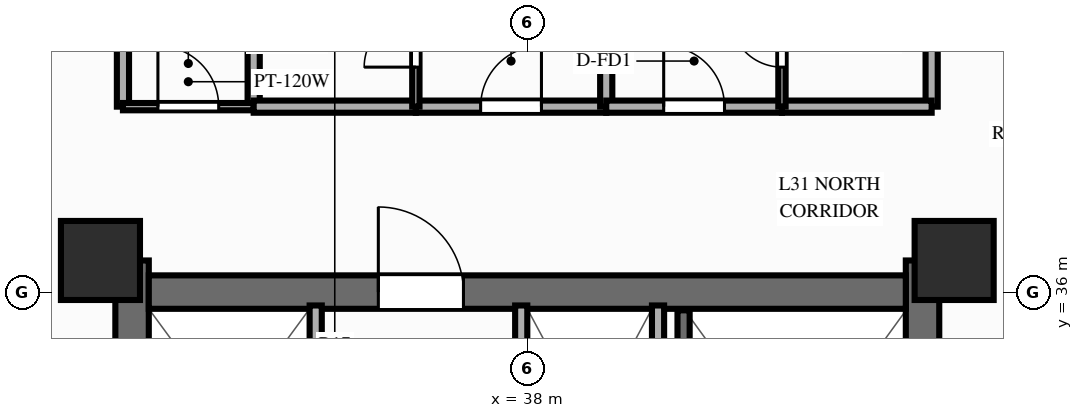
"""IFC4 building model, lengths in metres.
Left out: names, types, materials, properties, quantities, classifications, styles, units other than length and angle.
Written with IfcOpenShell. Run it as: python <this file> out.ifc"""

import sys

from ifc_helpers import new_model, si_unit, direction, frame, frame_2d, origin, origin_2d, place, context, subcontext, project, spatial, rectangle, extrude, source, transform, mapped, element, fill, save


model = new_model("IFC4")
c1 = context("Model", 3, precision=1e-05, world=origin(), true_north=direction((0.0, 1.0)))
c2 = subcontext(c1, "Body", "Model", "MODEL_VIEW")
j1 = project(units=[si_unit("LENGTHUNIT", "METRE"), si_unit("PLANEANGLEUNIT", "RADIAN")], contexts=[c1])
p1 = place(None, origin())
s1 = spatial("IfcSite", under=j1, at=p1, CompositionType="ELEMENT")
p2 = place(p1, origin())
s2 = spatial("IfcBuilding", under=s1, at=p2, CompositionType="ELEMENT")
p3 = place(p2, frame((0.0, 0.0, 98.85)))
s3 = spatial("IfcBuildingStorey", under=s2, at=p3, CompositionType="ELEMENT", Elevation=98.85)
p4 = place(p3, frame((31.5, 17.48, 0.0), z_axis=(0.0, 0.0, 1.0), x_axis=(0.0, 1.0, 0.0)))
e1 = element("IfcWall", 1, at=p4, inside=s3, PredefinedType="SHEAR", context=c2, shape_type="SweptSolid", body=[
    extrude(rectangle(XDim=19.04, YDim=0.55, at=frame_2d((9.52, 0.0))), origin(), (0.0, 0.0, 1.0), 3.0),
])
p5 = place(p4, frame((6.32, 0.0, 0.0)))
e2 = element("IfcOpeningElement", 2, at=p5, cuts=e1, PredefinedType="OPENING", context=c2, shape_type="SweptSolid", body=[
    extrude(rectangle(XDim=1.1, YDim=2.15, at=frame_2d((0.55, 1.075))), frame((0.0, 0.287, 0.0), z_axis=(0.0, -1.0, 0.0), x_axis=(1.0, 0.0, 0.0)), (0.0, 0.0, 1.0), 0.574),
])
p6 = place(p3, frame((44.5, 17.48, 0.0), z_axis=(0.0, 0.0, 1.0), x_axis=(0.0, 1.0, 0.0)))
e3 = element("IfcWall", 3, at=p6, inside=s3, PredefinedType="SHEAR", context=c2, shape_type="SweptSolid", body=[
    extrude(rectangle(XDim=19.04, YDim=0.55, at=frame_2d((9.52, 0.0))), origin(), (0.0, 0.0, 1.0), 3.0),
])
p7 = place(p6, frame((12.67, 0.0, 0.0), z_axis=(0.0, 0.0, 1.0), x_axis=(-1.0, 0.0, 0.0)))
e4 = element("IfcOpeningElement", 4, at=p7, cuts=e3, PredefinedType="OPENING", context=c2, shape_type="SweptSolid", body=[
    extrude(rectangle(XDim=1.1, YDim=2.15, at=frame_2d((0.55, 1.075))), frame((0.0, 0.287, 0.0), z_axis=(0.0, -1.0, 0.0), x_axis=(1.0, 0.0, 0.0)), (0.0, 0.0, 1.0), 0.574),
])
p8 = place(p3, frame((31.775, 36.0, 0.0), z_axis=(0.0, 0.0, 1.0), x_axis=(1.0, 0.0, 0.0)))
e5 = element("IfcWall", 5, at=p8, inside=s3, PredefinedType="SHEAR", context=c2, shape_type="SweptSolid", body=[
    extrude(rectangle(XDim=12.45, YDim=0.55, at=frame_2d((6.225, 0.0))), origin(), (0.0, 0.0, 1.0), 3.0),
])
p9 = place(p8, frame((5.175, 0.0, 0.0), z_axis=(0.0, 0.0, 1.0), x_axis=(-1.0, 0.0, 0.0)))
e6 = element("IfcOpeningElement", 6, at=p9, cuts=e5, PredefinedType="OPENING", context=c2, shape_type="SweptSolid", body=[
    extrude(rectangle(XDim=1.4, YDim=2.15, at=frame_2d((0.7, 1.075))), frame((0.0, 0.287, 0.0), z_axis=(0.0, -1.0, 0.0), x_axis=(1.0, 0.0, 0.0)), (0.0, 0.0, 1.0), 0.574),
])
m1 = source(origin(), c2, "Body", "SweptSolid", [
    extrude(rectangle(XDim=1.3, YDim=1.3, at=origin_2d()), origin(), (0.0, 0.0, 1.0), 3.0),
])
for number, where, z_axis, x_axis in (
    (7, (30.98, 36.52, 0.0), (0.0, 0.0, 1.0), (1.0, 0.0, 0.0)),
    (8, (45.02, 36.52, 0.0), (0.0, 0.0, 1.0), (1.0, 0.0, 0.0)),
):
    element("IfcColumn", number, at=place(p3, frame(where, z_axis=z_axis, x_axis=x_axis)), inside=s3, PredefinedType="COLUMN", context=c2, shape_type="MappedRepresentation", body=[
        mapped(m1, transform((0.0, 0.0, 0.0), scale=1.0)),
    ])
p10 = place(p3, frame((40.15, 31.8, 0.0), z_axis=(0.0, 0.0, 1.0), x_axis=(0.0, 1.0, 0.0)))
e9 = element("IfcWall", 9, at=p10, inside=s3, PredefinedType="PARTITIONING", context=c2, shape_type="SweptSolid", body=[
    extrude(rectangle(XDim=3.98, YDim=0.2, at=frame_2d((1.99, 0.0))), origin(), (0.0, 0.0, 1.0), 2.79),
])
p11 = place(p3, frame((40.57, 28.65, 0.0), z_axis=(0.0, 0.0, 1.0), x_axis=(0.0, 1.0, 0.0)))
e10 = element("IfcWall", 10, at=p11, inside=s3, PredefinedType="SOLIDWALL", context=c2, shape_type="SweptSolid", body=[
    extrude(rectangle(XDim=7.05, YDim=0.2, at=frame_2d((3.525, 0.0))), origin(), (0.0, 0.0, 1.0), 2.79),
])
p12 = place(p3, frame((34.52, 25.44, 0.0), z_axis=(0.0, 0.0, 1.0), x_axis=(0.0, 1.0, 0.0)))
e11 = element("IfcWall", 11, at=p12, inside=s3, PredefinedType="PARTITIONING", context=c2, shape_type="SweptSolid", body=[
    extrude(rectangle(XDim=10.34, YDim=0.2, at=frame_2d((5.17, 0.0))), origin(), (0.0, 0.0, 1.0), 2.79),
])
p13 = place(p12, frame((1.15, 0.0, 0.0)))
e12 = element("IfcOpeningElement", 12, at=p13, cuts=e11, PredefinedType="OPENING", context=c2, shape_type="SweptSolid", body=[
    extrude(rectangle(XDim=0.9, YDim=2.1, at=frame_2d((0.45, 1.05))), frame((0.0, 0.112, 0.0), z_axis=(0.0, -1.0, 0.0), x_axis=(1.0, 0.0, 0.0)), (0.0, 0.0, 1.0), 0.224),
])
p14 = place(p12, frame((4.35, 0.0, 0.0)))
e13 = element("IfcOpeningElement", 13, at=p14, cuts=e11, PredefinedType="OPENING", context=c2, shape_type="SweptSolid", body=[
    extrude(rectangle(XDim=0.9, YDim=2.1, at=frame_2d((0.45, 1.05))), frame((0.0, 0.112, 0.0), z_axis=(0.0, -1.0, 0.0), x_axis=(1.0, 0.0, 0.0)), (0.0, 0.0, 1.0), 0.224),
])
p15 = place(p3, frame((37.9, 25.44, 0.0), z_axis=(0.0, 0.0, 1.0), x_axis=(0.0, 1.0, 0.0)))
e14 = element("IfcWall", 14, at=p15, inside=s3, PredefinedType="PARTITIONING", context=c2, shape_type="SweptSolid", body=[
    extrude(rectangle(XDim=10.34, YDim=0.2, at=frame_2d((5.17, 0.0))), origin(), (0.0, 0.0, 1.0), 2.79),
])
p16 = place(p15, frame((0.32, 0.0, 0.0)))
e15 = element("IfcOpeningElement", 15, at=p16, cuts=e14, PredefinedType="OPENING", context=c2, shape_type="SweptSolid", body=[
    extrude(rectangle(XDim=1.0, YDim=2.15, at=frame_2d((0.5, 1.075))), frame((0.0, 0.112, 0.0), z_axis=(0.0, -1.0, 0.0), x_axis=(1.0, 0.0, 0.0)), (0.0, 0.0, 1.0), 0.224),
])
p17 = place(p15, frame((1.71, 0.0, 0.0)))
e16 = element("IfcOpeningElement", 16, at=p17, cuts=e14, PredefinedType="OPENING", context=c2, shape_type="SweptSolid", body=[
    extrude(rectangle(XDim=1.0, YDim=2.15, at=frame_2d((0.5, 1.075))), frame((0.0, 0.112, 0.0), z_axis=(0.0, -1.0, 0.0), x_axis=(1.0, 0.0, 0.0)), (0.0, 0.0, 1.0), 0.224),
])
p18 = place(p15, frame((3.51, 0.0, 0.0)))
e17 = element("IfcOpeningElement", 17, at=p18, cuts=e14, PredefinedType="OPENING", context=c2, shape_type="SweptSolid", body=[
    extrude(rectangle(XDim=1.0, YDim=2.15, at=frame_2d((0.5, 1.075))), frame((0.0, 0.112, 0.0), z_axis=(0.0, -1.0, 0.0), x_axis=(1.0, 0.0, 0.0)), (0.0, 0.0, 1.0), 0.224),
])
p19 = place(p15, frame((5.01, 0.0, 0.0)))
e18 = element("IfcOpeningElement", 18, at=p19, cuts=e14, PredefinedType="OPENING", context=c2, shape_type="SweptSolid", body=[
    extrude(rectangle(XDim=1.0, YDim=2.15, at=frame_2d((0.5, 1.075))), frame((0.0, 0.112, 0.0), z_axis=(0.0, -1.0, 0.0), x_axis=(1.0, 0.0, 0.0)), (0.0, 0.0, 1.0), 0.224),
])
for number, where, z_axis, x_axis in (
    (19, (31.35, 39.05, 0.0), (0.0, 0.0, 1.0), (0.0, 1.0, 0.0)),
    (20, (44.65, 39.05, 0.0), (0.0, 0.0, 1.0), (0.0, 1.0, 0.0)),
):
    element("IfcWall", number, at=place(p3, frame(where, z_axis=z_axis, x_axis=x_axis)), inside=s3, PredefinedType="PARTITIONING", context=c2, shape_type="SweptSolid", body=[
        extrude(rectangle(XDim=11.8, YDim=0.2, at=frame_2d((5.9, 0.0))), origin(), (0.0, 0.0, 1.0), 2.34),
    ])
p20 = place(p3, frame((33.5, 39.05, 0.0), z_axis=(0.0, 0.0, 1.0), x_axis=(0.0, 1.0, 0.0)))
e21 = element("IfcWall", 21, at=p20, inside=s3, PredefinedType="PARTITIONING", context=c2, shape_type="SweptSolid", body=[
    extrude(rectangle(XDim=11.8, YDim=0.2, at=frame_2d((5.9, 0.0))), origin(), (0.0, 0.0, 1.0), 2.79),
])
p21 = place(p3, frame((31.35, 39.05, 0.0), z_axis=(0.0, 0.0, 1.0), x_axis=(1.0, 0.0, 0.0)))
e22 = element("IfcWall", 22, at=p21, inside=s3, PredefinedType="PARTITIONING", context=c2, shape_type="SweptSolid", body=[
    extrude(rectangle(XDim=2.15, YDim=0.12, at=frame_2d((1.075, 0.0))), origin(), (0.0, 0.0, 1.0), 2.79),
])
p22 = place(p21, frame((0.575, 0.0, 0.0)))
e23 = element("IfcOpeningElement", 23, at=p22, cuts=e22, PredefinedType="OPENING", context=c2, shape_type="SweptSolid", body=[
    extrude(rectangle(XDim=1.0, YDim=2.1, at=frame_2d((0.5, 1.05))), frame((0.0, 0.072, 0.0), z_axis=(0.0, -1.0, 0.0), x_axis=(1.0, 0.0, 0.0)), (0.0, 0.0, 1.0), 0.144),
])
p23 = place(p3, frame((33.5, 39.05, 0.0), z_axis=(0.0, 0.0, 1.0), x_axis=(1.0, 0.0, 0.0)))
e24 = element("IfcWall", 24, at=p23, inside=s3, PredefinedType="PARTITIONING", context=c2, shape_type="SweptSolid", body=[
    extrude(rectangle(XDim=2.667, YDim=0.2, at=frame_2d((1.333, 0.0))), origin(), (0.0, 0.0, 1.0), 2.79),
])
p24 = place(p3, frame((36.167, 39.05, 0.0), z_axis=(0.0, 0.0, 1.0), x_axis=(1.0, 0.0, 0.0)))
e25 = element("IfcWall", 25, at=p24, inside=s3, PredefinedType="PARTITIONING", context=c2, shape_type="SweptSolid", body=[
    extrude(rectangle(XDim=3.131, YDim=0.2, at=frame_2d((1.565, 0.0))), origin(), (0.0, 0.0, 1.0), 2.79),
])
p25 = place(p24, frame((1.065, 0.0, 0.0)))
e26 = element("IfcOpeningElement", 26, at=p25, cuts=e25, PredefinedType="OPENING", context=c2, shape_type="SweptSolid", body=[
    extrude(rectangle(XDim=1.0, YDim=2.15, at=frame_2d((0.5, 1.075))), frame((0.0, 0.112, 0.0), z_axis=(0.0, -1.0, 0.0), x_axis=(1.0, 0.0, 0.0)), (0.0, 0.0, 1.0), 0.224),
])
p26 = place(p3, frame((36.167, 39.05, 0.0), z_axis=(0.0, 0.0, 1.0), x_axis=(0.0, 1.0, 0.0)))
e27 = element("IfcWall", 27, at=p26, inside=s3, PredefinedType="PARTITIONING", context=c2, shape_type="SweptSolid", body=[
    extrude(rectangle(XDim=2.15, YDim=0.12, at=frame_2d((1.075, 0.0))), origin(), (0.0, 0.0, 1.0), 2.79),
])
p27 = place(p26, frame((0.65, 0.0, 0.0)))
e28 = element("IfcOpeningElement", 28, at=p27, cuts=e27, PredefinedType="OPENING", context=c2, shape_type="SweptSolid", body=[
    extrude(rectangle(XDim=0.85, YDim=2.05, at=frame_2d((0.425, 1.025))), frame((0.0, 0.072, 0.0), z_axis=(0.0, -1.0, 0.0), x_axis=(1.0, 0.0, 0.0)), (0.0, 0.0, 1.0), 0.144),
])
p28 = place(p3, frame((39.298, 39.05, 0.0), z_axis=(0.0, 0.0, 1.0), x_axis=(0.0, 1.0, 0.0)))
e29 = element("IfcWall", 29, at=p28, inside=s3, PredefinedType="PARTITIONING", context=c2, shape_type="SweptSolid", body=[
    extrude(rectangle(XDim=11.8, YDim=0.2, at=frame_2d((5.9, 0.0))), origin(), (0.0, 0.0, 1.0), 2.79),
])
p29 = place(p3, frame((39.298, 39.05, 0.0), z_axis=(0.0, 0.0, 1.0), x_axis=(1.0, 0.0, 0.0)))
e30 = element("IfcWall", 30, at=p29, inside=s3, PredefinedType="PARTITIONING", context=c2, shape_type="SweptSolid", body=[
    extrude(rectangle(XDim=2.89, YDim=0.2, at=frame_2d((1.445, 0.0))), origin(), (0.0, 0.0, 1.0), 2.79),
])
p30 = place(p29, frame((0.945, 0.0, 0.0)))
e31 = element("IfcOpeningElement", 31, at=p30, cuts=e30, PredefinedType="OPENING", context=c2, shape_type="SweptSolid", body=[
    extrude(rectangle(XDim=1.0, YDim=2.15, at=frame_2d((0.5, 1.075))), frame((0.0, 0.112, 0.0), z_axis=(0.0, -1.0, 0.0), x_axis=(1.0, 0.0, 0.0)), (0.0, 0.0, 1.0), 0.224),
])
p31 = place(p3, frame((42.188, 39.05, 0.0), z_axis=(0.0, 0.0, 1.0), x_axis=(1.0, 0.0, 0.0)))
e32 = element("IfcWall", 32, at=p31, inside=s3, PredefinedType="PARTITIONING", context=c2, shape_type="SweptSolid", body=[
    extrude(rectangle(XDim=2.462, YDim=0.2, at=frame_2d((1.231, 0.0))), origin(), (0.0, 0.0, 1.0), 2.79),
])
p32 = place(p3, frame((42.188, 39.05, 0.0), z_axis=(0.0, 0.0, 1.0), x_axis=(0.0, 1.0, 0.0)))
e33 = element("IfcWall", 33, at=p32, inside=s3, PredefinedType="PARTITIONING", context=c2, shape_type="SweptSolid", body=[
    extrude(rectangle(XDim=2.15, YDim=0.12, at=frame_2d((1.075, 0.0))), origin(), (0.0, 0.0, 1.0), 2.79),
])
p33 = place(p32, frame((0.65, 0.0, 0.0)))
e34 = element("IfcOpeningElement", 34, at=p33, cuts=e33, PredefinedType="OPENING", context=c2, shape_type="SweptSolid", body=[
    extrude(rectangle(XDim=0.85, YDim=2.05, at=frame_2d((0.425, 1.025))), frame((0.0, 0.072, 0.0), z_axis=(0.0, -1.0, 0.0), x_axis=(1.0, 0.0, 0.0)), (0.0, 0.0, 1.0), 0.144),
])
m2 = source(origin(), c2, "Body", "SweptSolid", [
    extrude(rectangle(XDim=1.4, YDim=2.15, at=frame_2d((0.7, 1.075))), frame((0.0, 0.025, 0.0), z_axis=(0.0, -1.0, 0.0), x_axis=(1.0, 0.0, 0.0)), (0.0, 0.0, 1.0), 0.05),
])
p34 = place(p9, origin())
e35 = element("IfcDoor", 35, at=p34, inside=s3, OperationType="SINGLE_SWING_RIGHT", PredefinedType="DOOR", context=c2, shape_type="MappedRepresentation", body=[
    mapped(m2, transform((0.0, 0.0, 0.0), scale=1.0)),
])
fill(e6, e35)
m3 = source(origin(), c2, "Body", "SweptSolid", [
    extrude(rectangle(XDim=1.0, YDim=2.1, at=frame_2d((0.5, 1.05))), frame((0.0, 0.025, 0.0), z_axis=(0.0, -1.0, 0.0), x_axis=(1.0, 0.0, 0.0)), (0.0, 0.0, 1.0), 0.05),
])
p35 = place(p22, origin())
e36 = element("IfcDoor", 36, at=p35, inside=s3, OperationType="SINGLE_SWING_LEFT", PredefinedType="DOOR", context=c2, shape_type="MappedRepresentation", body=[
    mapped(m3, transform((0.0, 0.0, 0.0), scale=1.0)),
])
fill(e23, e36)
m4 = source(origin(), c2, "Body", "SweptSolid", [
    extrude(rectangle(XDim=1.0, YDim=2.15, at=frame_2d((0.5, 1.075))), frame((0.0, 0.025, 0.0), z_axis=(0.0, -1.0, 0.0), x_axis=(1.0, 0.0, 0.0)), (0.0, 0.0, 1.0), 0.05),
])
p36 = place(p25, origin())
e37 = element("IfcDoor", 37, at=p36, inside=s3, OperationType="SINGLE_SWING_RIGHT", PredefinedType="DOOR", context=c2, shape_type="MappedRepresentation", body=[
    mapped(m4, transform((0.0, 0.0, 0.0), scale=1.0)),
])
fill(e26, e37)
m5 = source(origin(), c2, "Body", "SweptSolid", [
    extrude(rectangle(XDim=0.85, YDim=2.05, at=frame_2d((0.425, 1.025))), frame((0.0, 0.025, 0.0), z_axis=(0.0, -1.0, 0.0), x_axis=(1.0, 0.0, 0.0)), (0.0, 0.0, 1.0), 0.05),
])
p37 = place(p27, origin())
e38 = element("IfcDoor", 38, at=p37, inside=s3, OperationType="SINGLE_SWING_LEFT", PredefinedType="DOOR", context=c2, shape_type="MappedRepresentation", body=[
    mapped(m5, transform((0.0, 0.0, 0.0), scale=1.0)),
])
fill(e28, e38)
p38 = place(p30, origin())
e39 = element("IfcDoor", 39, at=p38, inside=s3, OperationType="SINGLE_SWING_LEFT", PredefinedType="DOOR", context=c2, shape_type="MappedRepresentation", body=[
    mapped(m4, transform((0.0, 0.0, 0.0), scale=1.0)),
])
fill(e31, e39)
p39 = place(p33, origin())
e40 = element("IfcDoor", 40, at=p39, inside=s3, OperationType="SINGLE_SWING_RIGHT", PredefinedType="DOOR", context=c2, shape_type="MappedRepresentation", body=[
    mapped(m5, transform((0.0, 0.0, 0.0), scale=1.0)),
])
fill(e34, e40)
save(model, sys.argv[1])
